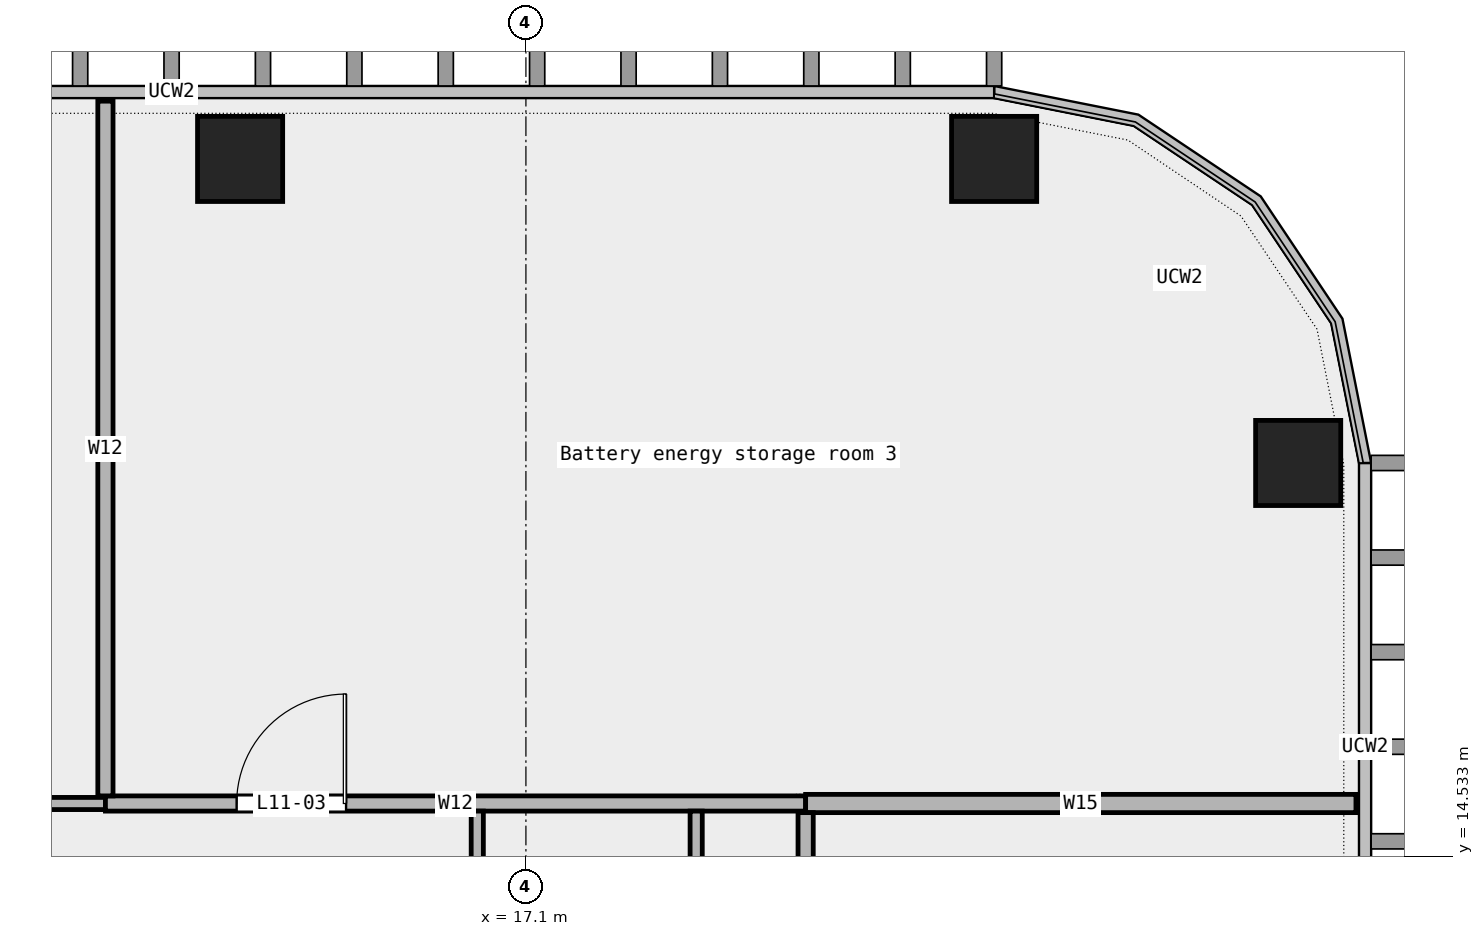
"""IFC4 building model, lengths in metres.
Left out: names, types, materials, properties, quantities, classifications, styles, units other than length and angle.
Written with IfcOpenShell. Run it as: python <this file> out.ifc"""

import sys

from ifc_helpers import new_model, si_unit, direction, frame, frame_2d, origin, origin_2d, place, context, subcontext, project, spatial, rectangle, extrude, element, fill, save


model = new_model("IFC4")
c1 = context("Model", 3, precision=1e-05, world=origin(), true_north=direction((0.0, 1.0)))
c2 = subcontext(c1, "Body", "Model", "MODEL_VIEW")
j1 = project(units=[si_unit("LENGTHUNIT", "METRE"), si_unit("PLANEANGLEUNIT", "RADIAN")], contexts=[c1])
p1 = place(None, origin())
s1 = spatial("IfcSite", under=j1, at=p1, CompositionType="ELEMENT")
p2 = place(p1, origin())
s2 = spatial("IfcBuilding", under=s1, at=p2, CompositionType="ELEMENT")
p3 = place(p2, frame((0.0, 0.0, 59.8)))
s3 = spatial("IfcBuildingStorey", under=s2, at=p3, CompositionType="ELEMENT", Elevation=59.8)
for number, where, z_axis, x_axis in (
    (1, (29.8, 21.0, 0.0), (0.0, 0.0, 1.0), (1.0, 0.0, 0.0)),
    (2, (24.8, 26.0, 0.0), (0.0, 0.0, 1.0), (1.0, 0.0, 0.0)),
    (3, (12.4, 26.0, 0.0), (0.0, 0.0, 1.0), (1.0, 0.0, 0.0)),
):
    element("IfcColumn", number, at=place(p3, frame(where, z_axis=z_axis, x_axis=x_axis)), inside=s3, PredefinedType="COLUMN", context=c2, shape_type="SweptSolid", body=[
        extrude(rectangle(XDim=1.4, YDim=1.4, at=origin_2d()), origin(), (0.0, 0.0, 1.0), 4.35),
    ])
p4 = place(p3, frame((-15.78, 15.4, 0.0), z_axis=(0.0, 0.0, 1.0), x_axis=(1.0, 0.0, 0.0)))
e4 = element("IfcWall", 4, at=p4, inside=s3, PredefinedType="PARTITIONING", context=c2, shape_type="SweptSolid", body=[
    extrude(rectangle(XDim=25.965, YDim=0.2, at=frame_2d((12.982, 0.0))), origin(), (0.0, 0.0, 1.0), 4.35),
])
p5 = place(p4, frame((19.395, 0.0, 0.0)))
e5 = element("IfcOpeningElement", 5, at=p5, cuts=e4, PredefinedType="OPENING", context=c2, shape_type="SweptSolid", body=[
    extrude(rectangle(XDim=1.5, YDim=2.1, at=frame_2d((0.75, 1.05))), frame((0.0, 0.112, 0.0), z_axis=(0.0, -1.0, 0.0), x_axis=(1.0, 0.0, 0.0)), (0.0, 0.0, 1.0), 0.224),
])
p6 = place(p4, frame((6.012, 0.0, 0.0)))
e6 = element("IfcOpeningElement", 6, at=p6, cuts=e4, PredefinedType="OPENING", context=c2, shape_type="SweptSolid", body=[
    extrude(rectangle(XDim=1.5, YDim=2.1, at=frame_2d((0.75, 1.05))), frame((0.0, 0.112, 0.0), z_axis=(0.0, -1.0, 0.0), x_axis=(1.0, 0.0, 0.0)), (0.0, 0.0, 1.0), 0.224),
])
p7 = place(p3, frame((10.185, 15.4, 0.0), z_axis=(0.0, 0.0, 1.0), x_axis=(1.0, 0.0, 0.0)))
e7 = element("IfcWall", 7, at=p7, inside=s3, PredefinedType="PARTITIONING", context=c2, shape_type="SweptSolid", body=[
    extrude(rectangle(XDim=11.515, YDim=0.25, at=frame_2d((5.757, 0.0))), origin(), (0.0, 0.0, 1.0), 4.35),
])
p8 = place(p7, frame((2.157, 0.0, 0.0)))
e8 = element("IfcOpeningElement", 8, at=p8, cuts=e7, PredefinedType="OPENING", context=c2, shape_type="SweptSolid", body=[
    extrude(rectangle(XDim=1.8, YDim=2.1, at=frame_2d((0.9, 1.05))), frame((0.0, 0.137, 0.0), z_axis=(0.0, -1.0, 0.0), x_axis=(1.0, 0.0, 0.0)), (0.0, 0.0, 1.0), 0.274),
])
p9 = place(p3, frame((21.7, 15.4, 0.0), z_axis=(0.0, 0.0, 1.0), x_axis=(1.0, 0.0, 0.0)))
e9 = element("IfcWall", 9, at=p9, inside=s3, PredefinedType="PARTITIONING", context=c2, shape_type="SweptSolid", body=[
    extrude(rectangle(XDim=9.05, YDim=0.3, at=frame_2d((4.525, 0.0))), origin(), (0.0, 0.0, 1.0), 4.35),
])
p10 = place(p3, frame((10.185, 15.525, 0.0), z_axis=(0.0, 0.0, 1.0), x_axis=(0.0, 1.0, 0.0)))
e10 = element("IfcWall", 10, at=p10, inside=s3, PredefinedType="PARTITIONING", context=c2, shape_type="SweptSolid", body=[
    extrude(rectangle(XDim=11.425, YDim=0.25, at=frame_2d((5.712, 0.0))), origin(), (0.0, 0.0, 1.0), 4.35),
])
p11 = place(p3, frame((16.3, 11.8, 0.0), z_axis=(0.0, 0.0, 1.0), x_axis=(0.0, 1.0, 0.0)))
e11 = element("IfcWall", 11, at=p11, inside=s3, PredefinedType="PARTITIONING", context=c2, shape_type="SweptSolid", body=[
    extrude(rectangle(XDim=3.475, YDim=0.2, at=frame_2d((1.737, 0.0))), origin(), (0.0, 0.0, 1.0), 4.35),
])
p12 = place(p3, frame((19.9, 8.18, 0.0), z_axis=(0.0, 0.0, 1.0), x_axis=(0.0, 1.0, 0.0)))
e12 = element("IfcWall", 12, at=p12, inside=s3, PredefinedType="PARTITIONING", context=c2, shape_type="SweptSolid", body=[
    extrude(rectangle(XDim=7.095, YDim=0.2, at=frame_2d((3.547, 0.0))), origin(), (0.0, 0.0, 1.0), 4.35),
])
p13 = place(p12, frame((3.097, 0.0, 0.0)))
e13 = element("IfcOpeningElement", 13, at=p13, cuts=e12, PredefinedType="OPENING", context=c2, shape_type="SweptSolid", body=[
    extrude(rectangle(XDim=0.9, YDim=2.1, at=frame_2d((0.45, 1.05))), frame((0.0, 0.112, 0.0), z_axis=(0.0, -1.0, 0.0), x_axis=(1.0, 0.0, 0.0)), (0.0, 0.0, 1.0), 0.224),
])
p14 = place(p3, frame((21.7, 11.79, 0.0), z_axis=(0.0, 0.0, 1.0), x_axis=(0.0, 1.0, 0.0)))
e14 = element("IfcWall", 14, at=p14, inside=s3, PredefinedType="PARTITIONING", context=c2, shape_type="SweptSolid", body=[
    extrude(rectangle(XDim=3.46, YDim=0.25, at=frame_2d((1.73, 0.0))), origin(), (0.0, 0.0, 1.0), 4.35),
])
p15 = place(p14, frame((1.28, 0.0, 0.0)))
e15 = element("IfcOpeningElement", 15, at=p15, cuts=e14, PredefinedType="OPENING", context=c2, shape_type="SweptSolid", body=[
    extrude(rectangle(XDim=0.9, YDim=2.1, at=frame_2d((0.45, 1.05))), frame((0.0, 0.137, 0.0), z_axis=(0.0, -1.0, 0.0), x_axis=(1.0, 0.0, 0.0)), (0.0, 0.0, 1.0), 0.274),
])
p16 = place(p8, origin())
e16 = element("IfcDoor", 16, at=p16, inside=s3, OperationType="DOUBLE_DOOR_SINGLE_SWING", PredefinedType="DOOR", context=c2, shape_type="SweptSolid", body=[
    extrude(rectangle(XDim=1.8, YDim=2.1, at=frame_2d((0.9, 1.05))), frame((0.0, 0.025, 0.0), z_axis=(0.0, -1.0, 0.0), x_axis=(1.0, 0.0, 0.0)), (0.0, 0.0, 1.0), 0.05),
])
fill(e8, e16)
save(model, sys.argv[1])
